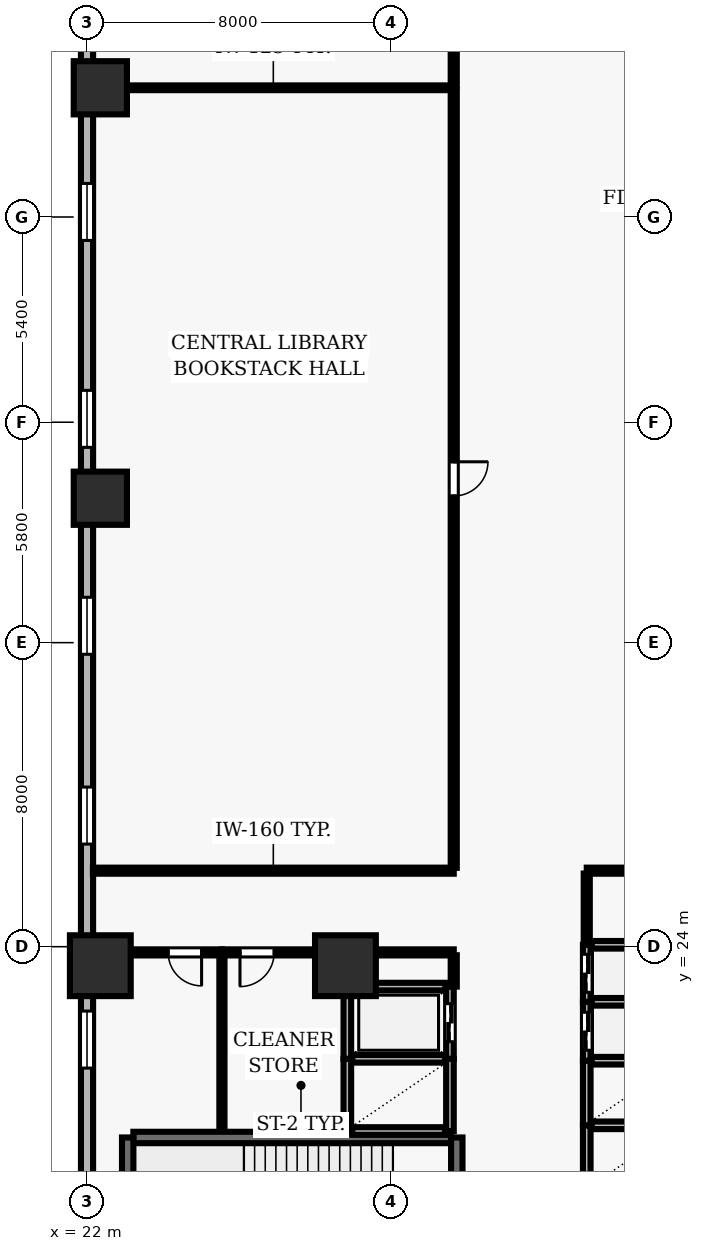
"""IFC4 building model, lengths in metres.
Left out: names, types, materials, properties, quantities, classifications, styles, units other than length and angle.
Written with IfcOpenShell. Run it as: python <this file> out.ifc"""

import sys

from ifc_helpers import new_model, si_unit, direction, frame, frame_2d, origin, origin_2d, place, context, subcontext, project, spatial, rectangle, extrude, element, fill, save


model = new_model("IFC4")
c1 = context("Model", 3, precision=1e-05, world=origin(), true_north=direction((0.0, 1.0)))
c2 = subcontext(c1, "Body", "Model", "MODEL_VIEW")
j1 = project(units=[si_unit("LENGTHUNIT", "METRE"), si_unit("PLANEANGLEUNIT", "RADIAN")], contexts=[c1])
p1 = place(None, origin())
s1 = spatial("IfcSite", under=j1, at=p1, CompositionType="ELEMENT")
p2 = place(p1, origin())
s2 = spatial("IfcBuilding", under=s1, at=p2, CompositionType="ELEMENT")
p3 = place(p2, frame((0.0, 0.0, 20.8)))
s3 = spatial("IfcBuildingStorey", under=s2, at=p3, CompositionType="ELEMENT", Elevation=20.8)
for number, where, z_axis, x_axis in (
    (1, (22.35, 23.5, 0.0), (0.0, 0.0, 1.0), (1.0, 0.0, 0.0)),
    (2, (28.8, 23.5, 0.0), (0.0, 0.0, 1.0), (1.0, 0.0, 0.0)),
):
    element("IfcColumn", number, at=place(p3, frame(where, z_axis=z_axis, x_axis=x_axis)), inside=s3, PredefinedType="COLUMN", context=c2, shape_type="SweptSolid", body=[
        extrude(rectangle(XDim=1.6, YDim=1.6, at=origin_2d()), origin(), (0.0, 0.0, 1.0), 5.2),
    ])
for number, where, z_axis, x_axis in (
    (3, (22.35, 35.8, 0.0), (0.0, 0.0, 1.0), (1.0, 0.0, 0.0)),
    (4, (22.35, 46.6, 0.0), (0.0, 0.0, 1.0), (1.0, 0.0, 0.0)),
):
    element("IfcColumn", number, at=place(p3, frame(where, z_axis=z_axis, x_axis=x_axis)), inside=s3, PredefinedType="COLUMN", context=c2, shape_type="SweptSolid", body=[
        extrude(rectangle(XDim=1.4, YDim=1.4, at=origin_2d()), origin(), (0.0, 0.0, 1.0), 5.2),
    ])
p4 = place(p3, frame((22.0, 51.5, 0.0), z_axis=(0.0, 0.0, 1.0), x_axis=(0.0, -1.0, 0.0)))
e5 = element("IfcWall", 5, at=p4, inside=s3, PredefinedType="SOLIDWALL", context=c2, shape_type="SweptSolid", body=[
    extrude(rectangle(XDim=49.0, YDim=0.32, at=frame_2d((24.5, 0.0))), origin(), (0.0, 0.0, 1.0), 4.78),
])
p5 = place(p4, frame((1.972, 0.0, 0.9)))
e6 = element("IfcOpeningElement", 6, at=p5, cuts=e5, PredefinedType="OPENING", context=c2, shape_type="SweptSolid", body=[
    extrude(rectangle(XDim=1.5, YDim=1.6, at=frame_2d((0.75, 0.8))), frame((0.0, 0.17, 0.0), z_axis=(0.0, -1.0, 0.0), x_axis=(1.0, 0.0, 0.0)), (0.0, 0.0, 1.0), 0.34),
])
p6 = place(p4, frame((7.417, 0.0, 0.9)))
e7 = element("IfcOpeningElement", 7, at=p6, cuts=e5, PredefinedType="OPENING", context=c2, shape_type="SweptSolid", body=[
    extrude(rectangle(XDim=1.5, YDim=1.6, at=frame_2d((0.75, 0.8))), frame((0.0, 0.17, 0.0), z_axis=(0.0, -1.0, 0.0), x_axis=(1.0, 0.0, 0.0)), (0.0, 0.0, 1.0), 0.34),
])
p7 = place(p4, frame((12.861, 0.0, 0.9)))
e8 = element("IfcOpeningElement", 8, at=p7, cuts=e5, PredefinedType="OPENING", context=c2, shape_type="SweptSolid", body=[
    extrude(rectangle(XDim=1.5, YDim=1.6, at=frame_2d((0.75, 0.8))), frame((0.0, 0.17, 0.0), z_axis=(0.0, -1.0, 0.0), x_axis=(1.0, 0.0, 0.0)), (0.0, 0.0, 1.0), 0.34),
])
p8 = place(p4, frame((18.306, 0.0, 0.9)))
e9 = element("IfcOpeningElement", 9, at=p8, cuts=e5, PredefinedType="OPENING", context=c2, shape_type="SweptSolid", body=[
    extrude(rectangle(XDim=1.5, YDim=1.6, at=frame_2d((0.75, 0.8))), frame((0.0, 0.17, 0.0), z_axis=(0.0, -1.0, 0.0), x_axis=(1.0, 0.0, 0.0)), (0.0, 0.0, 1.0), 0.34),
])
p9 = place(p4, frame((23.3, 0.0, 0.9)))
e10 = element("IfcOpeningElement", 10, at=p9, cuts=e5, PredefinedType="OPENING", context=c2, shape_type="SweptSolid", body=[
    extrude(rectangle(XDim=1.5, YDim=1.6, at=frame_2d((0.75, 0.8))), frame((0.0, 0.17, 0.0), z_axis=(0.0, -1.0, 0.0), x_axis=(1.0, 0.0, 0.0)), (0.0, 0.0, 1.0), 0.34),
])
p10 = place(p4, frame((29.194, 0.0, 0.9)))
e11 = element("IfcOpeningElement", 11, at=p10, cuts=e5, PredefinedType="OPENING", context=c2, shape_type="SweptSolid", body=[
    extrude(rectangle(XDim=1.5, YDim=1.6, at=frame_2d((0.75, 0.8))), frame((0.0, 0.17, 0.0), z_axis=(0.0, -1.0, 0.0), x_axis=(1.0, 0.0, 0.0)), (0.0, 0.0, 1.0), 0.34),
])
p11 = place(p4, frame((34.189, 0.0, 0.9)))
e12 = element("IfcOpeningElement", 12, at=p11, cuts=e5, PredefinedType="OPENING", context=c2, shape_type="SweptSolid", body=[
    extrude(rectangle(XDim=1.5, YDim=1.6, at=frame_2d((0.75, 0.8))), frame((0.0, 0.17, 0.0), z_axis=(0.0, -1.0, 0.0), x_axis=(1.0, 0.0, 0.0)), (0.0, 0.0, 1.0), 0.34),
])
p12 = place(p4, frame((40.083, 0.0, 0.9)))
e13 = element("IfcOpeningElement", 13, at=p12, cuts=e5, PredefinedType="OPENING", context=c2, shape_type="SweptSolid", body=[
    extrude(rectangle(XDim=1.5, YDim=1.6, at=frame_2d((0.75, 0.8))), frame((0.0, 0.17, 0.0), z_axis=(0.0, -1.0, 0.0), x_axis=(1.0, 0.0, 0.0)), (0.0, 0.0, 1.0), 0.34),
])
p13 = place(p3, frame((31.58, 18.98, 0.0), z_axis=(0.0, 0.0, 1.0), x_axis=(-1.0, 0.0, 0.0)))
e14 = element("IfcWall", 14, at=p13, inside=s3, PredefinedType="SHEAR", context=c2, shape_type="SweptSolid", body=[
    extrude(rectangle(XDim=8.36, YDim=0.3, at=frame_2d((4.18, 0.0))), origin(), (0.0, 0.0, 1.0), 4.78),
])
p14 = place(p3, frame((23.07, 18.98, 0.0), z_axis=(0.0, 0.0, 1.0), x_axis=(0.0, -1.0, 0.0)))
e15 = element("IfcWall", 15, at=p14, inside=s3, PredefinedType="SHEAR", context=c2, shape_type="SweptSolid", body=[
    extrude(rectangle(XDim=3.51, YDim=0.3, at=frame_2d((1.755, 0.0))), origin(), (0.0, 0.0, 1.0), 4.78),
])
p15 = place(p3, frame((31.73, 15.47, 0.0), z_axis=(0.0, 0.0, 1.0), x_axis=(0.0, 1.0, 0.0)))
e16 = element("IfcWall", 16, at=p15, inside=s3, PredefinedType="SHEAR", context=c2, shape_type="SweptSolid", body=[
    extrude(rectangle(XDim=3.51, YDim=0.3, at=frame_2d((1.755, 0.0))), origin(), (0.0, 0.0, 1.0), 4.78),
])
p16 = place(p15, frame((1.18, 0.0, 0.0)))
e17 = element("IfcOpeningElement", 17, at=p16, cuts=e16, PredefinedType="OPENING", context=c2, shape_type="SweptSolid", body=[
    extrude(rectangle(XDim=1.15, YDim=2.15, at=frame_2d((0.575, 1.075))), frame((0.0, 0.16, 0.0), z_axis=(0.0, -1.0, 0.0), x_axis=(1.0, 0.0, 0.0)), (0.0, 0.0, 1.0), 0.32),
])
p17 = place(p3, frame((35.15, 19.3, 0.0), z_axis=(0.0, 0.0, 1.0), x_axis=(0.0, -1.0, 0.0)))
e18 = element("IfcWall", 18, at=p17, inside=s3, PredefinedType="SOLIDWALL", context=c2, shape_type="SweptSolid", body=[
    extrude(rectangle(XDim=1.7, YDim=0.2, at=frame_2d((0.85, 0.0))), origin(), (0.0, 0.0, 1.0), 4.78),
])
p18 = place(p3, frame((37.42, 19.3, 0.0), z_axis=(0.0, 0.0, 1.0), x_axis=(-1.0, 0.0, 0.0)))
e19 = element("IfcWall", 19, at=p18, inside=s3, PredefinedType="SOLIDWALL", context=c2, shape_type="SweptSolid", body=[
    extrude(rectangle(XDim=2.14, YDim=0.2, at=frame_2d((1.07, 0.0))), origin(), (0.0, 0.0, 1.0), 4.78),
])
p19 = place(p3, frame((35.15, 21.0, 0.0), z_axis=(0.0, 0.0, 1.0), x_axis=(0.0, -1.0, 0.0)))
e20 = element("IfcWall", 20, at=p19, inside=s3, PredefinedType="SOLIDWALL", context=c2, shape_type="SweptSolid", body=[
    extrude(rectangle(XDim=1.7, YDim=0.2, at=frame_2d((0.85, 0.0))), origin(), (0.0, 0.0, 1.0), 4.78),
])
p20 = place(p3, frame((37.42, 21.0, 0.0), z_axis=(0.0, 0.0, 1.0), x_axis=(-1.0, 0.0, 0.0)))
e21 = element("IfcWall", 21, at=p20, inside=s3, PredefinedType="SOLIDWALL", context=c2, shape_type="SweptSolid", body=[
    extrude(rectangle(XDim=2.14, YDim=0.2, at=frame_2d((1.07, 0.0))), origin(), (0.0, 0.0, 1.0), 4.78),
])
for number, where, z_axis, x_axis in (
    (22, (28.85, 21.05, 0.0), (0.0, 0.0, 1.0), (0.0, -1.0, 0.0)),
    (23, (31.55, 19.15, 0.0), (0.0, 0.0, 1.0), (0.0, 1.0, 0.0)),
):
    element("IfcWall", number, at=place(p3, frame(where, z_axis=z_axis, x_axis=x_axis)), inside=s3, PredefinedType="SOLIDWALL", context=c2, shape_type="SweptSolid", body=[
        extrude(rectangle(XDim=1.9, YDim=0.2, at=frame_2d((0.95, 0.0))), origin(), (0.0, 0.0, 1.0), 4.78),
    ])
for number, where, z_axis, x_axis in (
    (24, (28.98, 19.15, 0.0), (0.0, 0.0, 1.0), (1.0, 0.0, 0.0)),
    (25, (31.42, 21.05, 0.0), (0.0, 0.0, 1.0), (-1.0, 0.0, 0.0)),
):
    element("IfcWall", number, at=place(p3, frame(where, z_axis=z_axis, x_axis=x_axis)), inside=s3, PredefinedType="SOLIDWALL", context=c2, shape_type="SweptSolid", body=[
        extrude(rectangle(XDim=2.44, YDim=0.2, at=frame_2d((1.22, 0.0))), origin(), (0.0, 0.0, 1.0), 4.78),
    ])
p21 = place(p3, frame((35.15, 22.55, 0.0), z_axis=(0.0, 0.0, 1.0), x_axis=(0.0, -1.0, 0.0)))
e26 = element("IfcWall", 26, at=p21, inside=s3, PredefinedType="SOLIDWALL", context=c2, shape_type="SweptSolid", body=[
    extrude(rectangle(XDim=1.55, YDim=0.2, at=frame_2d((0.775, 0.0))), origin(), (0.0, 0.0, 1.0), 4.78),
])
p22 = place(p21, frame((0.275, 0.0, 0.0)))
e27 = element("IfcOpeningElement", 27, at=p22, cuts=e26, PredefinedType="OPENING", context=c2, shape_type="SweptSolid", body=[
    extrude(rectangle(XDim=1.0, YDim=2.1, at=frame_2d((0.5, 1.05))), frame((0.0, 0.11, 0.0), z_axis=(0.0, -1.0, 0.0), x_axis=(1.0, 0.0, 0.0)), (0.0, 0.0, 1.0), 0.22),
])
p23 = place(p3, frame((37.42, 22.55, 0.0), z_axis=(0.0, 0.0, 1.0), x_axis=(-1.0, 0.0, 0.0)))
e28 = element("IfcWall", 28, at=p23, inside=s3, PredefinedType="SOLIDWALL", context=c2, shape_type="SweptSolid", body=[
    extrude(rectangle(XDim=2.14, YDim=0.2, at=frame_2d((1.07, 0.0))), origin(), (0.0, 0.0, 1.0), 4.78),
])
p24 = place(p3, frame((35.15, 24.05, 0.0), z_axis=(0.0, 0.0, 1.0), x_axis=(0.0, -1.0, 0.0)))
e29 = element("IfcWall", 29, at=p24, inside=s3, PredefinedType="SOLIDWALL", context=c2, shape_type="SweptSolid", body=[
    extrude(rectangle(XDim=1.5, YDim=0.2, at=frame_2d((0.75, 0.0))), origin(), (0.0, 0.0, 1.0), 4.78),
])
p25 = place(p24, frame((0.25, 0.0, 0.0)))
e30 = element("IfcOpeningElement", 30, at=p25, cuts=e29, PredefinedType="OPENING", context=c2, shape_type="SweptSolid", body=[
    extrude(rectangle(XDim=1.0, YDim=2.1, at=frame_2d((0.5, 1.05))), frame((0.0, 0.11, 0.0), z_axis=(0.0, -1.0, 0.0), x_axis=(1.0, 0.0, 0.0)), (0.0, 0.0, 1.0), 0.22),
])
p26 = place(p3, frame((37.42, 24.05, 0.0), z_axis=(0.0, 0.0, 1.0), x_axis=(-1.0, 0.0, 0.0)))
e31 = element("IfcWall", 31, at=p26, inside=s3, PredefinedType="SOLIDWALL", context=c2, shape_type="SweptSolid", body=[
    extrude(rectangle(XDim=2.14, YDim=0.2, at=frame_2d((1.07, 0.0))), origin(), (0.0, 0.0, 1.0), 4.78),
])
p27 = place(p3, frame((28.85, 22.95, 0.0), z_axis=(0.0, 0.0, 1.0), x_axis=(0.0, -1.0, 0.0)))
e32 = element("IfcWall", 32, at=p27, inside=s3, PredefinedType="SOLIDWALL", context=c2, shape_type="SweptSolid", body=[
    extrude(rectangle(XDim=1.9, YDim=0.2, at=frame_2d((0.95, 0.0))), origin(), (0.0, 0.0, 1.0), 4.78),
])
p28 = place(p3, frame((31.55, 21.05, 0.0), z_axis=(0.0, 0.0, 1.0), x_axis=(0.0, 1.0, 0.0)))
e33 = element("IfcWall", 33, at=p28, inside=s3, PredefinedType="SOLIDWALL", context=c2, shape_type="SweptSolid", body=[
    extrude(rectangle(XDim=1.9, YDim=0.2, at=frame_2d((0.95, 0.0))), origin(), (0.0, 0.0, 1.0), 4.78),
])
p29 = place(p28, frame((0.45, 0.0, 0.0)))
e34 = element("IfcOpeningElement", 34, at=p29, cuts=e33, PredefinedType="OPENING", context=c2, shape_type="SweptSolid", body=[
    extrude(rectangle(XDim=1.0, YDim=2.1, at=frame_2d((0.5, 1.05))), frame((0.0, 0.11, 0.0), z_axis=(0.0, -1.0, 0.0), x_axis=(1.0, 0.0, 0.0)), (0.0, 0.0, 1.0), 0.22),
])
p30 = place(p3, frame((31.43, 22.95, 0.0), z_axis=(0.0, 0.0, 1.0), x_axis=(-1.0, 0.0, 0.0)))
e35 = element("IfcWall", 35, at=p30, inside=s3, PredefinedType="SOLIDWALL", context=c2, shape_type="SweptSolid", body=[
    extrude(rectangle(XDim=2.46, YDim=0.2, at=frame_2d((1.23, 0.0))), origin(), (0.0, 0.0, 1.0), 4.78),
])
p31 = place(p3, frame((25.55, 23.85, 0.0), z_axis=(0.0, 0.0, 1.0), x_axis=(-1.0, 0.0, 0.0)))
e36 = element("IfcWall", 36, at=p31, inside=s3, PredefinedType="PARTITIONING", context=c2, shape_type="SweptSolid", body=[
    extrude(rectangle(XDim=3.35, YDim=0.16, at=frame_2d((1.675, 0.0))), origin(), (0.0, 0.0, 1.0), 3.768),
])
p32 = place(p31, frame((0.535, 0.0, 0.0)))
e37 = element("IfcOpeningElement", 37, at=p32, cuts=e36, PredefinedType="OPENING", context=c2, shape_type="SweptSolid", body=[
    extrude(rectangle(XDim=0.88, YDim=2.1, at=frame_2d((0.44, 1.05))), frame((0.0, 0.09, 0.0), z_axis=(0.0, -1.0, 0.0), x_axis=(1.0, 0.0, 0.0)), (0.0, 0.0, 1.0), 0.18),
])
p33 = place(p3, frame((28.8, 23.85, 0.0), z_axis=(0.0, 0.0, 1.0), x_axis=(-1.0, 0.0, 0.0)))
e38 = element("IfcWall", 38, at=p33, inside=s3, PredefinedType="PARTITIONING", context=c2, shape_type="SweptSolid", body=[
    extrude(rectangle(XDim=3.25, YDim=0.16, at=frame_2d((1.625, 0.0))), origin(), (0.0, 0.0, 1.0), 3.768),
])
p34 = place(p33, frame((1.875, 0.0, 0.0)))
e39 = element("IfcOpeningElement", 39, at=p34, cuts=e38, PredefinedType="OPENING", context=c2, shape_type="SweptSolid", body=[
    extrude(rectangle(XDim=0.9, YDim=2.1, at=frame_2d((0.45, 1.05))), frame((0.0, 0.09, 0.0), z_axis=(0.0, -1.0, 0.0), x_axis=(1.0, 0.0, 0.0)), (0.0, 0.0, 1.0), 0.18),
])
p35 = place(p3, frame((28.8, 23.85, 0.0), z_axis=(0.0, 0.0, 1.0), x_axis=(1.0, 0.0, 0.0)))
e40 = element("IfcWall", 40, at=p35, inside=s3, PredefinedType="PARTITIONING", context=c2, shape_type="SweptSolid", body=[
    extrude(rectangle(XDim=2.85, YDim=0.16, at=frame_2d((1.425, 0.0))), origin(), (0.0, 0.0, 1.0), 4.78),
])
p36 = place(p3, frame((31.65, 26.0, 0.0), z_axis=(0.0, 0.0, 1.0), x_axis=(-1.0, 0.0, 0.0)))
e41 = element("IfcWall", 41, at=p36, inside=s3, PredefinedType="PARTITIONING", context=c2, shape_type="SweptSolid", body=[
    extrude(rectangle(XDim=9.495, YDim=0.16, at=frame_2d((4.748, 0.0))), origin(), (0.0, 0.0, 1.0), 4.78),
])
p37 = place(p3, frame((31.65, 46.6, 0.0), z_axis=(0.0, 0.0, 1.0), x_axis=(-1.0, 0.0, 0.0)))
e42 = element("IfcWall", 42, at=p37, inside=s3, PredefinedType="PARTITIONING", context=c2, shape_type="SweptSolid", body=[
    extrude(rectangle(XDim=9.495, YDim=0.125, at=frame_2d((4.748, 0.0))), origin(), (0.0, 0.0, 1.0), 3.58),
])
p38 = place(p3, frame((35.15, 26.0, 0.0), z_axis=(0.0, 0.0, 1.0), x_axis=(1.0, 0.0, 0.0)))
e43 = element("IfcWall", 43, at=p38, inside=s3, PredefinedType="PARTITIONING", context=c2, shape_type="SweptSolid", body=[
    extrude(rectangle(XDim=3.1, YDim=0.16, at=frame_2d((1.55, 0.0))), origin(), (0.0, 0.0, 1.0), 4.78),
])
p39 = place(p3, frame((25.55, 19.16, 0.0), z_axis=(0.0, 0.0, 1.0), x_axis=(0.0, 1.0, 0.0)))
e44 = element("IfcWall", 44, at=p39, inside=s3, PredefinedType="PARTITIONING", context=c2, shape_type="SweptSolid", body=[
    extrude(rectangle(XDim=4.615, YDim=0.135, at=frame_2d((2.308, 0.0))), origin(), (0.0, 0.0, 1.0), 4.78),
])
p40 = place(p3, frame((28.8, 22.95, 0.0), z_axis=(0.0, 0.0, 1.0), x_axis=(0.0, 1.0, 0.0)))
e45 = element("IfcWall", 45, at=p40, inside=s3, PredefinedType="PARTITIONING", context=c2, shape_type="SweptSolid", body=[
    extrude(rectangle(XDim=0.825, YDim=0.125, at=frame_2d((0.413, 0.0))), origin(), (0.0, 0.0, 1.0), 4.78),
])
p41 = place(p3, frame((31.65, 23.775, 0.0), z_axis=(0.0, 0.0, 1.0), x_axis=(0.0, -1.0, 0.0)))
e46 = element("IfcWall", 46, at=p41, inside=s3, PredefinedType="PARTITIONING", context=c2, shape_type="SweptSolid", body=[
    extrude(rectangle(XDim=0.825, YDim=0.16, at=frame_2d((0.413, 0.0))), origin(), (0.0, 0.0, 1.0), 4.78),
])
p42 = place(p3, frame((31.65, 46.543, 0.0), z_axis=(0.0, 0.0, 1.0), x_axis=(0.0, -1.0, 0.0)))
e47 = element("IfcWall", 47, at=p42, inside=s3, PredefinedType="PARTITIONING", context=c2, shape_type="SweptSolid", body=[
    extrude(rectangle(XDim=20.468, YDim=0.16, at=frame_2d((10.234, 0.0))), origin(), (0.0, 0.0, 1.0), 4.78),
])
p43 = place(p42, frame((9.784, 0.0, 0.0)))
e48 = element("IfcOpeningElement", 48, at=p43, cuts=e47, PredefinedType="OPENING", context=c2, shape_type="SweptSolid", body=[
    extrude(rectangle(XDim=0.9, YDim=2.1, at=frame_2d((0.45, 1.05))), frame((0.0, 0.09, 0.0), z_axis=(0.0, -1.0, 0.0), x_axis=(1.0, 0.0, 0.0)), (0.0, 0.0, 1.0), 0.18),
])
p44 = place(p3, frame((31.65, 53.91, 0.0), z_axis=(0.0, 0.0, 1.0), x_axis=(0.0, -1.0, 0.0)))
e49 = element("IfcWall", 49, at=p44, inside=s3, PredefinedType="PARTITIONING", context=c2, shape_type="SweptSolid", body=[
    extrude(rectangle(XDim=7.253, YDim=0.16, at=frame_2d((3.626, 0.0))), origin(), (0.0, 0.0, 1.0), 4.78),
])
p45 = place(p44, frame((3.176, 0.0, 0.0)))
e50 = element("IfcOpeningElement", 50, at=p45, cuts=e49, PredefinedType="OPENING", context=c2, shape_type="SweptSolid", body=[
    extrude(rectangle(XDim=0.9, YDim=2.1, at=frame_2d((0.45, 1.05))), frame((0.0, 0.09, 0.0), z_axis=(0.0, -1.0, 0.0), x_axis=(1.0, 0.0, 0.0)), (0.0, 0.0, 1.0), 0.18),
])
p46 = place(p3, frame((35.15, 24.07, 0.0), z_axis=(0.0, 0.0, 1.0), x_axis=(0.0, 1.0, 0.0)))
e51 = element("IfcWall", 51, at=p46, inside=s3, PredefinedType="PARTITIONING", context=c2, shape_type="SweptSolid", body=[
    extrude(rectangle(XDim=1.855, YDim=0.16, at=frame_2d((0.927, 0.0))), origin(), (0.0, 0.0, 1.0), 4.78),
])
p47 = place(p6, origin())
e52 = element("IfcWindow", 52, at=p47, inside=s3, PartitioningType="SINGLE_PANEL", PredefinedType="WINDOW", context=c2, shape_type="SweptSolid", body=[
    extrude(rectangle(XDim=1.5, YDim=1.6, at=frame_2d((0.75, 0.8))), frame((0.0, 0.03, 0.0), z_axis=(0.0, -1.0, 0.0), x_axis=(1.0, 0.0, 0.0)), (0.0, 0.0, 1.0), 0.06),
])
fill(e7, e52)
p48 = place(p7, origin())
e53 = element("IfcWindow", 53, at=p48, inside=s3, PartitioningType="SINGLE_PANEL", PredefinedType="WINDOW", context=c2, shape_type="SweptSolid", body=[
    extrude(rectangle(XDim=1.5, YDim=1.6, at=frame_2d((0.75, 0.8))), frame((0.0, 0.03, 0.0), z_axis=(0.0, -1.0, 0.0), x_axis=(1.0, 0.0, 0.0)), (0.0, 0.0, 1.0), 0.06),
])
fill(e8, e53)
p49 = place(p8, origin())
e54 = element("IfcWindow", 54, at=p49, inside=s3, PartitioningType="SINGLE_PANEL", PredefinedType="WINDOW", context=c2, shape_type="SweptSolid", body=[
    extrude(rectangle(XDim=1.5, YDim=1.6, at=frame_2d((0.75, 0.8))), frame((0.0, 0.03, 0.0), z_axis=(0.0, -1.0, 0.0), x_axis=(1.0, 0.0, 0.0)), (0.0, 0.0, 1.0), 0.06),
])
fill(e9, e54)
p50 = place(p9, origin())
e55 = element("IfcWindow", 55, at=p50, inside=s3, PartitioningType="SINGLE_PANEL", PredefinedType="WINDOW", context=c2, shape_type="SweptSolid", body=[
    extrude(rectangle(XDim=1.5, YDim=1.6, at=frame_2d((0.75, 0.8))), frame((0.0, 0.03, 0.0), z_axis=(0.0, -1.0, 0.0), x_axis=(1.0, 0.0, 0.0)), (0.0, 0.0, 1.0), 0.06),
])
fill(e10, e55)
p51 = place(p10, origin())
e56 = element("IfcWindow", 56, at=p51, inside=s3, PartitioningType="SINGLE_PANEL", PredefinedType="WINDOW", context=c2, shape_type="SweptSolid", body=[
    extrude(rectangle(XDim=1.5, YDim=1.6, at=frame_2d((0.75, 0.8))), frame((0.0, 0.03, 0.0), z_axis=(0.0, -1.0, 0.0), x_axis=(1.0, 0.0, 0.0)), (0.0, 0.0, 1.0), 0.06),
])
fill(e11, e56)
p52 = place(p22, origin())
e57 = element("IfcDoor", 57, at=p52, inside=s3, OperationType="DOUBLE_DOOR_SLIDING", PredefinedType="DOOR", context=c2, shape_type="SweptSolid", body=[
    extrude(rectangle(XDim=1.0, YDim=2.1, at=frame_2d((0.5, 1.05))), frame((0.0, 0.025, 0.0), z_axis=(0.0, -1.0, 0.0), x_axis=(1.0, 0.0, 0.0)), (0.0, 0.0, 1.0), 0.05),
])
fill(e27, e57)
p53 = place(p25, origin())
e58 = element("IfcDoor", 58, at=p53, inside=s3, OperationType="DOUBLE_DOOR_SLIDING", PredefinedType="DOOR", context=c2, shape_type="SweptSolid", body=[
    extrude(rectangle(XDim=1.0, YDim=2.1, at=frame_2d((0.5, 1.05))), frame((0.0, 0.025, 0.0), z_axis=(0.0, -1.0, 0.0), x_axis=(1.0, 0.0, 0.0)), (0.0, 0.0, 1.0), 0.05),
])
fill(e30, e58)
p54 = place(p29, origin())
e59 = element("IfcDoor", 59, at=p54, inside=s3, OperationType="DOUBLE_DOOR_SLIDING", PredefinedType="DOOR", context=c2, shape_type="SweptSolid", body=[
    extrude(rectangle(XDim=1.0, YDim=2.1, at=frame_2d((0.5, 1.05))), frame((0.0, 0.025, 0.0), z_axis=(0.0, -1.0, 0.0), x_axis=(1.0, 0.0, 0.0)), (0.0, 0.0, 1.0), 0.05),
])
fill(e34, e59)
p55 = place(p32, origin())
e60 = element("IfcDoor", 60, at=p55, inside=s3, OperationType="SINGLE_SWING_LEFT", PredefinedType="DOOR", context=c2, shape_type="SweptSolid", body=[
    extrude(rectangle(XDim=0.88, YDim=2.1, at=frame_2d((0.44, 1.05))), frame((0.0, 0.025, 0.0), z_axis=(0.0, -1.0, 0.0), x_axis=(1.0, 0.0, 0.0)), (0.0, 0.0, 1.0), 0.05),
])
fill(e37, e60)
p56 = place(p34, origin())
e61 = element("IfcDoor", 61, at=p56, inside=s3, OperationType="SINGLE_SWING_RIGHT", PredefinedType="DOOR", context=c2, shape_type="SweptSolid", body=[
    extrude(rectangle(XDim=0.9, YDim=2.1, at=frame_2d((0.45, 1.05))), frame((0.0, 0.025, 0.0), z_axis=(0.0, -1.0, 0.0), x_axis=(1.0, 0.0, 0.0)), (0.0, 0.0, 1.0), 0.05),
])
fill(e39, e61)
p57 = place(p43, origin())
e62 = element("IfcDoor", 62, at=p57, inside=s3, OperationType="SINGLE_SWING_LEFT", PredefinedType="DOOR", context=c2, shape_type="SweptSolid", body=[
    extrude(rectangle(XDim=0.9, YDim=2.1, at=frame_2d((0.45, 1.05))), frame((0.0, 0.025, 0.0), z_axis=(0.0, -1.0, 0.0), x_axis=(1.0, 0.0, 0.0)), (0.0, 0.0, 1.0), 0.05),
])
fill(e48, e62)
save(model, sys.argv[1])
